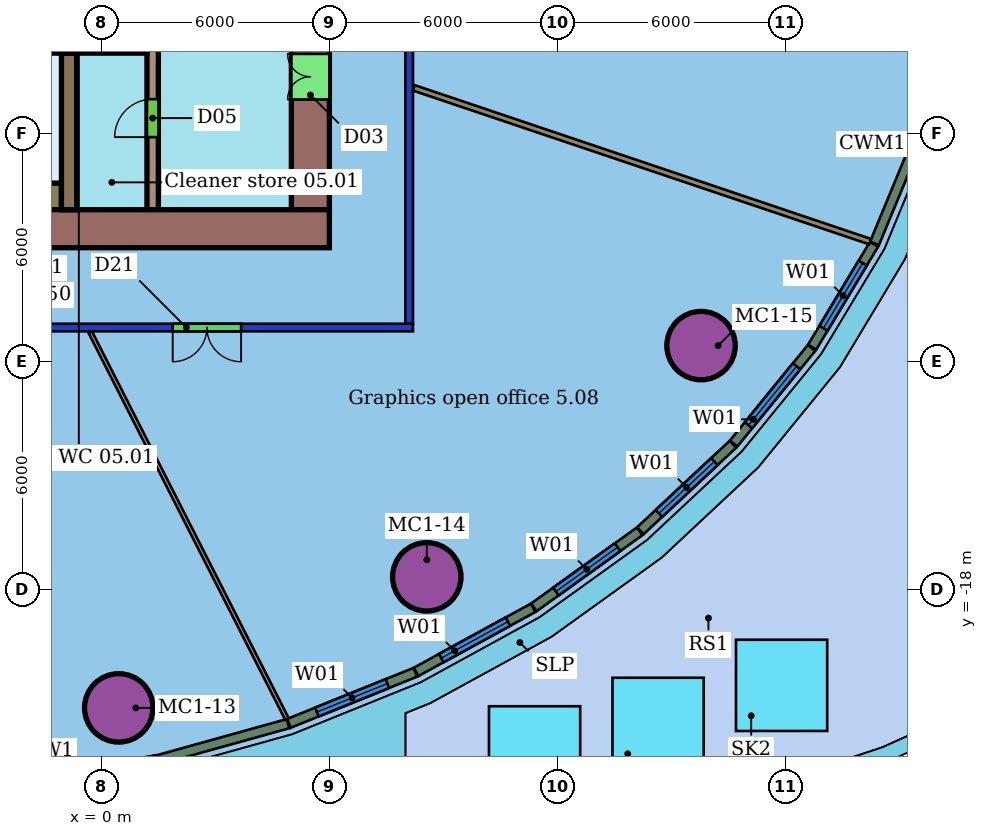
"""IFC4 building model, lengths in metres.
Left out: names, types, materials, properties, quantities, classifications, styles, units other than length and angle.
Written with IfcOpenShell. Run it as: python <this file> out.ifc"""

import sys

from ifc_helpers import new_model, si_unit, direction, frame, frame_2d, origin, origin_2d, place, context, subcontext, project, spatial, rectangle, hollow_circle, extrude, element, fill, save


model = new_model("IFC4")
c1 = context("Model", 3, precision=1e-05, world=origin(), true_north=direction((0.0, 1.0)))
c2 = subcontext(c1, "Body", "Model", "MODEL_VIEW")
j1 = project(units=[si_unit("LENGTHUNIT", "METRE"), si_unit("PLANEANGLEUNIT", "RADIAN")], contexts=[c1])
p1 = place(None, origin())
s1 = spatial("IfcSite", under=j1, at=p1, CompositionType="ELEMENT")
p2 = place(p1, origin())
s2 = spatial("IfcBuilding", under=s1, at=p2, CompositionType="ELEMENT")
p3 = place(p2, frame((0.0, 0.0, 36.0)))
s3 = spatial("IfcBuildingStorey", under=s2, at=p3, CompositionType="ELEMENT", Elevation=36.0)
for number, where, z_axis, x_axis in (
    (1, (0.458, -21.108, 0.0), (0.0, 0.0, 1.0), (1.0, 0.0, 0.0)),
    (2, (8.563, -17.66, 0.0), (0.0, 0.0, 1.0), (1.0, 0.0, 0.0)),
    (3, (15.78, -11.576, 0.0), (0.0, 0.0, 1.0), (1.0, 0.0, 0.0)),
):
    element("IfcColumn", number, at=place(p3, frame(where, z_axis=z_axis, x_axis=x_axis)), inside=s3, PredefinedType="COLUMN", context=c2, shape_type="SweptSolid", body=[
        extrude(hollow_circle(Radius=0.9, WallThickness=0.06, at=origin_2d()), origin(), (0.0, 0.0, 1.0), 3.55),
    ])
p4 = place(p3, frame((8.2, -11.1, 0.0), z_axis=(0.0, 0.0, 1.0), x_axis=(-1.0, 0.0, 0.0)))
e4 = element("IfcWall", 4, at=p4, inside=s3, PredefinedType="PARTITIONING", context=c2, shape_type="SweptSolid", body=[
    extrude(rectangle(XDim=28.4, YDim=0.2, at=frame_2d((14.2, 0.0))), origin(), (0.0, 0.0, 1.0), 2.85),
])
p5 = place(p4, frame((12.215, 0.0, 0.0)))
e5 = element("IfcOpeningElement", 5, at=p5, cuts=e4, PredefinedType="OPENING", context=c2, shape_type="SweptSolid", body=[
    extrude(rectangle(XDim=1.8, YDim=2.1, at=frame_2d((0.9, 1.05))), frame((0.0, 0.11, 0.0), z_axis=(0.0, -1.0, 0.0), x_axis=(1.0, 0.0, 0.0)), (0.0, 0.0, 1.0), 0.22),
])
p6 = place(p4, frame((4.522, 0.0, 0.0)))
e6 = element("IfcOpeningElement", 6, at=p6, cuts=e4, PredefinedType="OPENING", context=c2, shape_type="SweptSolid", body=[
    extrude(rectangle(XDim=1.8, YDim=2.1, at=frame_2d((0.9, 1.05))), frame((0.0, 0.11, 0.0), z_axis=(0.0, -1.0, 0.0), x_axis=(1.0, 0.0, 0.0)), (0.0, 0.0, 1.0), 0.22),
])
p7 = place(p3, frame((8.1, 11.0, 0.0), z_axis=(0.0, 0.0, 1.0), x_axis=(0.0, -1.0, 0.0)))
e7 = element("IfcWall", 7, at=p7, inside=s3, PredefinedType="PARTITIONING", context=c2, shape_type="SweptSolid", body=[
    extrude(rectangle(XDim=22.0, YDim=0.2, at=frame_2d((11.0, 0.0))), origin(), (0.0, 0.0, 1.0), 2.85),
])
p8 = place(p7, frame((6.305, 0.0, 0.0)))
e8 = element("IfcOpeningElement", 8, at=p8, cuts=e7, PredefinedType="OPENING", context=c2, shape_type="SweptSolid", body=[
    extrude(rectangle(XDim=1.1, YDim=2.1, at=frame_2d((0.55, 1.05))), frame((0.0, 0.11, 0.0), z_axis=(0.0, -1.0, 0.0), x_axis=(1.0, 0.0, 0.0)), (0.0, 0.0, 1.0), 0.22),
])
p9 = place(p7, frame((13.064, 0.0, 0.0)))
e9 = element("IfcOpeningElement", 9, at=p9, cuts=e7, PredefinedType="OPENING", context=c2, shape_type="SweptSolid", body=[
    extrude(rectangle(XDim=0.9, YDim=2.1, at=frame_2d((0.45, 1.05))), frame((0.0, 0.11, 0.0), z_axis=(0.0, -1.0, 0.0), x_axis=(1.0, 0.0, 0.0)), (0.0, 0.0, 1.0), 0.22),
])
p10 = place(p3, frame((4.885, -21.401, 0.0), z_axis=(0.0, 0.0, 1.0), x_axis=(-0.453334779339, 0.89134032661, 0.0)))
e10 = element("IfcWall", 10, at=p10, inside=s3, PredefinedType="PARTITIONING", context=c2, shape_type="SweptSolid", body=[
    extrude(rectangle(XDim=11.419, YDim=0.1, at=frame_2d((5.709, 0.0))), origin(), (0.0, 0.0, 1.0), 3.55),
])
p11 = place(p3, frame((20.229, -8.84, 0.0), z_axis=(0.0, 0.0, 1.0), x_axis=(-0.947627736463, 0.319377007762, 0.0)))
e11 = element("IfcWall", 11, at=p11, inside=s3, PredefinedType="PARTITIONING", context=c2, shape_type="SweptSolid", body=[
    extrude(rectangle(XDim=12.668, YDim=0.15, at=frame_2d((6.334, 0.0))), origin(), (0.0, 0.0, 1.0), 3.55),
])
p12 = place(p3, frame((1.443, -22.488, 0.0), z_axis=(0.0, 0.0, 1.0), x_axis=(0.963430499259, 0.267958342093, 0.0)))
e12 = element("IfcWall", 12, at=p12, inside=s3, PredefinedType="SOLIDWALL", context=c2, shape_type="SweptSolid", body=[
    extrude(rectangle(XDim=3.604, YDim=0.25, at=frame_2d((1.802, 0.0))), origin(), (0.0, 0.0, 1.0), 3.15),
])
p13 = place(p3, frame((4.935, -21.515, 0.0), z_axis=(0.0, 0.0, 1.0), x_axis=(0.927147291409, 0.374697077694, 0.0)))
e13 = element("IfcWall", 13, at=p13, inside=s3, PredefinedType="SOLIDWALL", context=c2, shape_type="SweptSolid", body=[
    extrude(rectangle(XDim=3.588, YDim=0.25, at=frame_2d((1.794, 0.0))), origin(), (0.0, 0.0, 1.0), 3.15),
])
p14 = place(p13, frame((0.794, 0.0, 0.8)))
e14 = element("IfcOpeningElement", 14, at=p14, cuts=e13, PredefinedType="OPENING", context=c2, shape_type="SweptSolid", body=[
    extrude(rectangle(XDim=2.0, YDim=2.2, at=frame_2d((1.0, 1.1))), frame((0.0, 0.135, 0.0), z_axis=(0.0, -1.0, 0.0), x_axis=(1.0, 0.0, 0.0)), (0.0, 0.0, 1.0), 0.27),
])
p15 = place(p3, frame((8.282, -20.162, 0.0), z_axis=(0.0, 0.0, 1.0), x_axis=(0.8771213679, 0.480268785134, 0.0)))
e15 = element("IfcWall", 15, at=p15, inside=s3, PredefinedType="SOLIDWALL", context=c2, shape_type="SweptSolid", body=[
    extrude(rectangle(XDim=3.512, YDim=0.25, at=frame_2d((1.756, 0.0))), origin(), (0.0, 0.0, 1.0), 3.15),
])
p16 = place(p15, frame((0.756, 0.0, 0.8)))
e16 = element("IfcOpeningElement", 16, at=p16, cuts=e15, PredefinedType="OPENING", context=c2, shape_type="SweptSolid", body=[
    extrude(rectangle(XDim=2.0, YDim=2.2, at=frame_2d((1.0, 1.1))), frame((0.0, 0.135, 0.0), z_axis=(0.0, -1.0, 0.0), x_axis=(1.0, 0.0, 0.0)), (0.0, 0.0, 1.0), 0.27),
])
p17 = place(p3, frame((11.382, -18.462, 0.0), z_axis=(0.0, 0.0, 1.0), x_axis=(0.812059685452, 0.5835743888, 0.0)))
e17 = element("IfcWall", 17, at=p17, inside=s3, PredefinedType="SOLIDWALL", context=c2, shape_type="SweptSolid", body=[
    extrude(rectangle(XDim=3.427, YDim=0.25, at=frame_2d((1.713, 0.0))), origin(), (0.0, 0.0, 1.0), 3.15),
])
p18 = place(p17, frame((0.713, 0.0, 0.8)))
e18 = element("IfcOpeningElement", 18, at=p18, cuts=e17, PredefinedType="OPENING", context=c2, shape_type="SweptSolid", body=[
    extrude(rectangle(XDim=2.0, YDim=2.2, at=frame_2d((1.0, 1.1))), frame((0.0, 0.135, 0.0), z_axis=(0.0, -1.0, 0.0), x_axis=(1.0, 0.0, 0.0)), (0.0, 0.0, 1.0), 0.27),
])
p19 = place(p3, frame((14.183, -16.448, 0.0), z_axis=(0.0, 0.0, 1.0), x_axis=(0.730670592597, 0.682730170063, 0.0)))
e19 = element("IfcWall", 19, at=p19, inside=s3, PredefinedType="SOLIDWALL", context=c2, shape_type="SweptSolid", body=[
    extrude(rectangle(XDim=3.336, YDim=0.25, at=frame_2d((1.668, 0.0))), origin(), (0.0, 0.0, 1.0), 3.15),
])
p20 = place(p19, frame((0.668, 0.0, 0.8)))
e20 = element("IfcOpeningElement", 20, at=p20, cuts=e19, PredefinedType="OPENING", context=c2, shape_type="SweptSolid", body=[
    extrude(rectangle(XDim=2.0, YDim=2.2, at=frame_2d((1.0, 1.1))), frame((0.0, 0.135, 0.0), z_axis=(0.0, -1.0, 0.0), x_axis=(1.0, 0.0, 0.0)), (0.0, 0.0, 1.0), 0.27),
])
p21 = place(p3, frame((16.637, -14.152, 0.0), z_axis=(0.0, 0.0, 1.0), x_axis=(0.631970989947, 0.774992043743, 0.0)))
e21 = element("IfcWall", 21, at=p21, inside=s3, PredefinedType="SOLIDWALL", context=c2, shape_type="SweptSolid", body=[
    extrude(rectangle(XDim=3.245, YDim=0.25, at=frame_2d((1.623, 0.0))), origin(), (0.0, 0.0, 1.0), 3.15),
])
p22 = place(p21, frame((0.623, 0.0, 0.8)))
e22 = element("IfcOpeningElement", 22, at=p22, cuts=e21, PredefinedType="OPENING", context=c2, shape_type="SweptSolid", body=[
    extrude(rectangle(XDim=2.0, YDim=2.2, at=frame_2d((1.0, 1.1))), frame((0.0, 0.135, 0.0), z_axis=(0.0, -1.0, 0.0), x_axis=(1.0, 0.0, 0.0)), (0.0, 0.0, 1.0), 0.27),
])
p23 = place(p3, frame((18.703, -11.616, 0.0), z_axis=(0.0, 0.0, 1.0), x_axis=(0.51563096518, 0.856810777096, 0.0)))
e23 = element("IfcWall", 23, at=p23, inside=s3, PredefinedType="SOLIDWALL", context=c2, shape_type="SweptSolid", body=[
    extrude(rectangle(XDim=3.161, YDim=0.25, at=frame_2d((1.581, 0.0))), origin(), (0.0, 0.0, 1.0), 3.15),
])
p24 = place(p23, frame((0.581, 0.0, 0.8)))
e24 = element("IfcOpeningElement", 24, at=p24, cuts=e23, PredefinedType="OPENING", context=c2, shape_type="SweptSolid", body=[
    extrude(rectangle(XDim=2.0, YDim=2.2, at=frame_2d((1.0, 1.1))), frame((0.0, 0.135, 0.0), z_axis=(0.0, -1.0, 0.0), x_axis=(1.0, 0.0, 0.0)), (0.0, 0.0, 1.0), 0.27),
])
p25 = place(p3, frame((20.345, -8.884, 0.0), z_axis=(0.0, 0.0, 1.0), x_axis=(0.382665181283, 0.923887092146, 0.0)))
e25 = element("IfcWall", 25, at=p25, inside=s3, PredefinedType="SOLIDWALL", context=c2, shape_type="SweptSolid", body=[
    extrude(rectangle(XDim=3.05, YDim=0.25, at=frame_2d((1.525, 0.0))), origin(), (0.0, 0.0, 1.0), 3.15),
])
p26 = place(p3, frame((-18.0, -8.5, 0.0), z_axis=(0.0, 0.0, 1.0), x_axis=(1.0, 0.0, 0.0)))
e26 = element("IfcWall", 26, at=p26, inside=s3, PredefinedType="SHEAR", context=c2, shape_type="SweptSolid", body=[
    extrude(rectangle(XDim=24.0, YDim=1.0, at=frame_2d((12.0, 0.0))), origin(), (0.0, 0.0, 1.0), 3.4),
])
p27 = place(p26, frame((6.0, 0.0, 0.0)))
e27 = element("IfcOpeningElement", 27, at=p27, cuts=e26, PredefinedType="OPENING", context=c2, shape_type="SweptSolid", body=[
    extrude(rectangle(XDim=1.2, YDim=2.1, at=frame_2d((0.6, 1.05))), frame((0.0, 0.51, 0.0), z_axis=(0.0, -1.0, 0.0), x_axis=(1.0, 0.0, 0.0)), (0.0, 0.0, 1.0), 1.02),
])
p28 = place(p3, frame((5.5, -8.0, 0.0), z_axis=(0.0, 0.0, 1.0), x_axis=(0.0, 1.0, 0.0)))
e28 = element("IfcWall", 28, at=p28, inside=s3, PredefinedType="SHEAR", context=c2, shape_type="SweptSolid", body=[
    extrude(rectangle(XDim=16.0, YDim=1.0, at=frame_2d((8.0, 0.0))), origin(), (0.0, 0.0, 1.0), 3.4),
])
p29 = place(p28, frame((2.9, 0.0, 0.0)))
e29 = element("IfcOpeningElement", 29, at=p29, cuts=e28, PredefinedType="OPENING", context=c2, shape_type="SweptSolid", body=[
    extrude(rectangle(XDim=1.2, YDim=2.1, at=frame_2d((0.6, 1.05))), frame((0.0, 0.51, 0.0), z_axis=(0.0, -1.0, 0.0), x_axis=(1.0, 0.0, 0.0)), (0.0, 0.0, 1.0), 1.02),
])
p30 = place(p28, frame((11.9, 0.0, 0.0)))
e30 = element("IfcOpeningElement", 30, at=p30, cuts=e28, PredefinedType="OPENING", context=c2, shape_type="SweptSolid", body=[
    extrude(rectangle(XDim=1.2, YDim=2.1, at=frame_2d((0.6, 1.05))), frame((0.0, 0.51, 0.0), z_axis=(0.0, -1.0, 0.0), x_axis=(1.0, 0.0, 0.0)), (0.0, 0.0, 1.0), 1.02),
])
p31 = place(p3, frame((-6.0, -3.58, 0.0), z_axis=(0.0, 0.0, 1.0), x_axis=(1.0, 0.0, 0.0)))
e31 = element("IfcWall", 31, at=p31, inside=s3, PredefinedType="SHEAR", context=c2, shape_type="SweptSolid", body=[
    extrude(rectangle(XDim=7.2, YDim=0.6, at=frame_2d((3.6, 0.0))), origin(), (0.0, 0.0, 1.0), 3.4),
])
p32 = place(p3, frame((1.35, -8.0, 0.0), z_axis=(0.0, 0.0, 1.0), x_axis=(0.0, 1.0, 0.0)))
e32 = element("IfcWall", 32, at=p32, inside=s3, PredefinedType="SHEAR", context=c2, shape_type="SweptSolid", body=[
    extrude(rectangle(XDim=16.0, YDim=0.3, at=frame_2d((8.0, 0.0))), origin(), (0.0, 0.0, 1.0), 3.4),
])
p33 = place(p32, frame((1.91, 0.0, 0.0)))
e33 = element("IfcOpeningElement", 33, at=p33, cuts=e32, PredefinedType="OPENING", context=c2, shape_type="SweptSolid", body=[
    extrude(rectangle(XDim=1.0, YDim=2.1, at=frame_2d((0.5, 1.05))), frame((0.0, 0.16, 0.0), z_axis=(0.0, -1.0, 0.0), x_axis=(1.0, 0.0, 0.0)), (0.0, 0.0, 1.0), 0.32),
])
p34 = place(p32, frame((7.25, 0.0, 0.0)))
e34 = element("IfcOpeningElement", 34, at=p34, cuts=e32, PredefinedType="OPENING", context=c2, shape_type="SweptSolid", body=[
    extrude(rectangle(XDim=1.5, YDim=2.1, at=frame_2d((0.75, 1.05))), frame((0.0, 0.16, 0.0), z_axis=(0.0, -1.0, 0.0), x_axis=(1.0, 0.0, 0.0)), (0.0, 0.0, 1.0), 0.32),
])
p35 = place(p3, frame((-0.85, -3.88, 0.0), z_axis=(0.0, 0.0, 1.0), x_axis=(0.0, -1.0, 0.0)))
e35 = element("IfcWall", 35, at=p35, inside=s3, PredefinedType="SHEAR", context=c2, shape_type="SweptSolid", body=[
    extrude(rectangle(XDim=4.12, YDim=0.4, at=frame_2d((2.06, 0.0))), origin(), (0.0, 0.0, 1.0), 3.4),
])
p36 = place(p3, frame((-8.1, -7.65, 0.0), z_axis=(0.0, 0.0, 1.0), x_axis=(1.0, 0.0, 0.0)))
e36 = element("IfcWall", 36, at=p36, inside=s3, PredefinedType="SHEAR", context=c2, shape_type="SweptSolid", body=[
    extrude(rectangle(XDim=7.05, YDim=0.7, at=frame_2d((3.525, 0.0))), origin(), (0.0, 0.0, 1.0), 3.4),
])
p37 = place(p6, origin())
e37 = element("IfcDoor", 37, at=p37, inside=s3, OperationType="DOUBLE_DOOR_SINGLE_SWING", PredefinedType="DOOR", context=c2, shape_type="SweptSolid", body=[
    extrude(rectangle(XDim=1.8, YDim=2.1, at=frame_2d((0.9, 1.05))), frame((0.0, 0.025, 0.0), z_axis=(0.0, -1.0, 0.0), x_axis=(1.0, 0.0, 0.0)), (0.0, 0.0, 1.0), 0.05),
])
fill(e6, e37)
p38 = place(p14, origin())
e38 = element("IfcWindow", 38, at=p38, inside=s3, PartitioningType="SINGLE_PANEL", PredefinedType="WINDOW", context=c2, shape_type="SweptSolid", body=[
    extrude(rectangle(XDim=2.0, YDim=2.2, at=frame_2d((1.0, 1.1))), frame((0.0, 0.03, 0.0), z_axis=(0.0, -1.0, 0.0), x_axis=(1.0, 0.0, 0.0)), (0.0, 0.0, 1.0), 0.06),
])
fill(e14, e38)
p39 = place(p16, origin())
e39 = element("IfcWindow", 39, at=p39, inside=s3, PartitioningType="SINGLE_PANEL", PredefinedType="WINDOW", context=c2, shape_type="SweptSolid", body=[
    extrude(rectangle(XDim=2.0, YDim=2.2, at=frame_2d((1.0, 1.1))), frame((0.0, 0.03, 0.0), z_axis=(0.0, -1.0, 0.0), x_axis=(1.0, 0.0, 0.0)), (0.0, 0.0, 1.0), 0.06),
])
fill(e16, e39)
p40 = place(p18, origin())
e40 = element("IfcWindow", 40, at=p40, inside=s3, PartitioningType="SINGLE_PANEL", PredefinedType="WINDOW", context=c2, shape_type="SweptSolid", body=[
    extrude(rectangle(XDim=2.0, YDim=2.2, at=frame_2d((1.0, 1.1))), frame((0.0, 0.03, 0.0), z_axis=(0.0, -1.0, 0.0), x_axis=(1.0, 0.0, 0.0)), (0.0, 0.0, 1.0), 0.06),
])
fill(e18, e40)
p41 = place(p20, origin())
e41 = element("IfcWindow", 41, at=p41, inside=s3, PartitioningType="SINGLE_PANEL", PredefinedType="WINDOW", context=c2, shape_type="SweptSolid", body=[
    extrude(rectangle(XDim=2.0, YDim=2.2, at=frame_2d((1.0, 1.1))), frame((0.0, 0.03, 0.0), z_axis=(0.0, -1.0, 0.0), x_axis=(1.0, 0.0, 0.0)), (0.0, 0.0, 1.0), 0.06),
])
fill(e20, e41)
p42 = place(p22, origin())
e42 = element("IfcWindow", 42, at=p42, inside=s3, PartitioningType="SINGLE_PANEL", PredefinedType="WINDOW", context=c2, shape_type="SweptSolid", body=[
    extrude(rectangle(XDim=2.0, YDim=2.2, at=frame_2d((1.0, 1.1))), frame((0.0, 0.03, 0.0), z_axis=(0.0, -1.0, 0.0), x_axis=(1.0, 0.0, 0.0)), (0.0, 0.0, 1.0), 0.06),
])
fill(e22, e42)
p43 = place(p24, origin())
e43 = element("IfcWindow", 43, at=p43, inside=s3, PartitioningType="SINGLE_PANEL", PredefinedType="WINDOW", context=c2, shape_type="SweptSolid", body=[
    extrude(rectangle(XDim=2.0, YDim=2.2, at=frame_2d((1.0, 1.1))), frame((0.0, 0.03, 0.0), z_axis=(0.0, -1.0, 0.0), x_axis=(1.0, 0.0, 0.0)), (0.0, 0.0, 1.0), 0.06),
])
fill(e24, e43)
p44 = place(p3, frame((0.0, 0.0, -0.15)))
p45 = place(p44, frame((11.4, -22.265, 0.0)))
p46 = place(p45, frame((0.0, 0.0, 0.1)))
e44 = element("IfcWindow", 44, at=p46, inside=s3, PartitioningType="SINGLE_PANEL", PredefinedType="SKYLIGHT", context=c2, shape_type="SweptSolid", body=[
    extrude(rectangle(XDim=2.4, YDim=2.4, at=origin_2d()), origin(), (0.0, 0.0, 1.0), 0.05),
])
p47 = place(p44, frame((14.65, -21.515, 0.0)))
p48 = place(p47, frame((0.0, 0.0, 0.1)))
e45 = element("IfcWindow", 45, at=p48, inside=s3, PartitioningType="SINGLE_PANEL", PredefinedType="SKYLIGHT", context=c2, shape_type="SweptSolid", body=[
    extrude(rectangle(XDim=2.4, YDim=2.4, at=origin_2d()), origin(), (0.0, 0.0, 1.0), 0.05),
])
p49 = place(p44, frame((17.9, -20.515, 0.0)))
p50 = place(p49, frame((0.0, 0.0, 0.1)))
e46 = element("IfcWindow", 46, at=p50, inside=s3, PartitioningType="SINGLE_PANEL", PredefinedType="SKYLIGHT", context=c2, shape_type="SweptSolid", body=[
    extrude(rectangle(XDim=2.4, YDim=2.4, at=origin_2d()), origin(), (0.0, 0.0, 1.0), 0.05),
])
p51 = place(p29, origin())
e47 = element("IfcDoor", 47, at=p51, inside=s3, OperationType="DOUBLE_DOOR_SINGLE_SWING", PredefinedType="NOTDEFINED", context=c2, shape_type="SweptSolid", body=[
    extrude(rectangle(XDim=1.2, YDim=2.1, at=frame_2d((0.6, 1.05))), frame((0.0, 0.025, 0.0), z_axis=(0.0, -1.0, 0.0), x_axis=(1.0, 0.0, 0.0)), (0.0, 0.0, 1.0), 0.05),
])
fill(e29, e47)
p52 = place(p33, origin())
e48 = element("IfcDoor", 48, at=p52, inside=s3, OperationType="SINGLE_SWING_LEFT", PredefinedType="NOTDEFINED", context=c2, shape_type="SweptSolid", body=[
    extrude(rectangle(XDim=1.0, YDim=2.1, at=frame_2d((0.5, 1.05))), frame((0.0, 0.025, 0.0), z_axis=(0.0, -1.0, 0.0), x_axis=(1.0, 0.0, 0.0)), (0.0, 0.0, 1.0), 0.05),
])
fill(e33, e48)
save(model, sys.argv[1])
